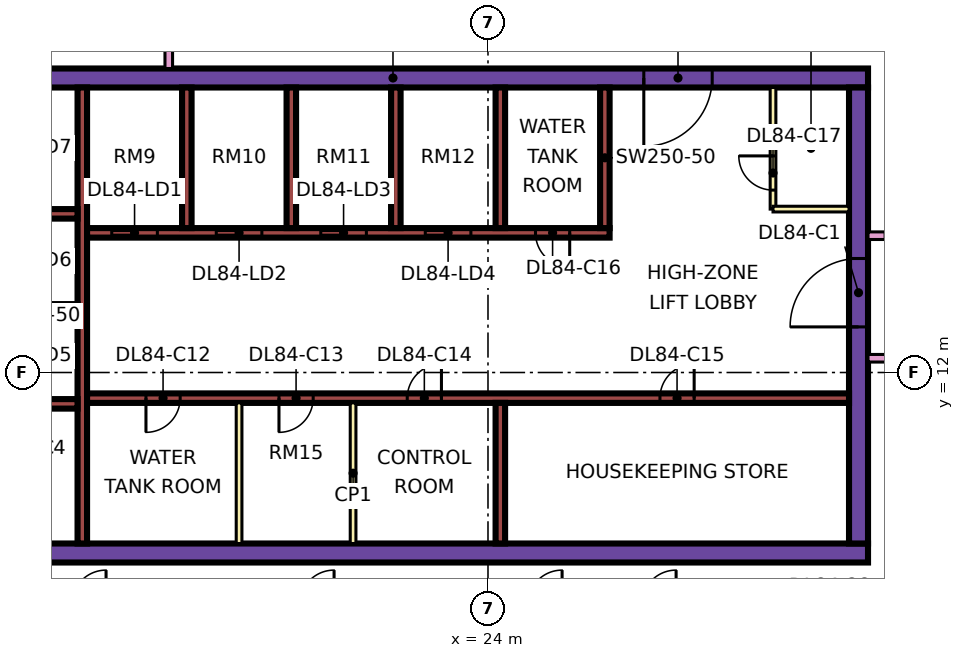
"""IFC4 building model, lengths in metres.
Left out: names, types, materials, properties, quantities, classifications, styles, units other than length and angle.
Written with IfcOpenShell. Run it as: python <this file> out.ifc"""

import sys

from ifc_helpers import new_model, si_unit, direction, frame, frame_2d, origin, place, context, subcontext, project, spatial, rectangle, extrude, element, fill, save


model = new_model("IFC4")
c1 = context("Model", 3, precision=1e-05, world=origin(), true_north=direction((0.0, 1.0)))
c2 = subcontext(c1, "Body", "Model", "MODEL_VIEW")
j1 = project(units=[si_unit("LENGTHUNIT", "METRE"), si_unit("PLANEANGLEUNIT", "RADIAN")], contexts=[c1])
p1 = place(None, origin())
s1 = spatial("IfcSite", under=j1, at=p1, CompositionType="ELEMENT")
p2 = place(p1, origin())
s2 = spatial("IfcBuilding", under=s1, at=p2, CompositionType="ELEMENT")
p3 = place(p2, frame((0.0, 0.0, 361.4)))
s3 = spatial("IfcBuildingStorey", under=s2, at=p3, CompositionType="ELEMENT", Elevation=361.4)
p4 = place(p3, frame((9.0, 7.25, 0.0), z_axis=(0.0, 0.0, 1.0), x_axis=(1.0, 0.0, 0.0)))
e1 = element("IfcWall", 1, at=p4, inside=s3, PredefinedType="SHEAR", context=c2, shape_type="SweptSolid", body=[
    extrude(rectangle(XDim=25.0, YDim=0.5, at=frame_2d((12.5, 0.0))), origin(), (0.0, 0.0, 1.0), 3.75),
])
p5 = place(p3, frame((9.0, 19.75, 0.0), z_axis=(0.0, 0.0, 1.0), x_axis=(1.0, 0.0, 0.0)))
e2 = element("IfcWall", 2, at=p5, inside=s3, PredefinedType="SHEAR", context=c2, shape_type="SweptSolid", body=[
    extrude(rectangle(XDim=25.0, YDim=0.5, at=frame_2d((12.5, 0.0))), origin(), (0.0, 0.0, 1.0), 3.75),
])
p6 = place(p5, frame((19.1, 0.0, 0.0)))
e3 = element("IfcOpeningElement", 3, at=p6, cuts=e2, PredefinedType="OPENING", context=c2, shape_type="SweptSolid", body=[
    extrude(rectangle(XDim=1.8, YDim=2.4, at=frame_2d((0.9, 1.2))), frame((0.0, 0.26, 0.0), z_axis=(0.0, -1.0, 0.0), x_axis=(1.0, 0.0, 0.0)), (0.0, 0.0, 1.0), 0.52),
])
p7 = place(p3, frame((33.75, 7.5, 0.0), z_axis=(0.0, 0.0, 1.0), x_axis=(0.0, 1.0, 0.0)))
e4 = element("IfcWall", 4, at=p7, inside=s3, PredefinedType="SHEAR", context=c2, shape_type="SweptSolid", body=[
    extrude(rectangle(XDim=12.0, YDim=0.5, at=frame_2d((6.0, 0.0))), origin(), (0.0, 0.0, 1.0), 3.75),
])
p8 = place(p7, frame((5.7, 0.0, 0.0)))
e5 = element("IfcOpeningElement", 5, at=p8, cuts=e4, PredefinedType="OPENING", context=c2, shape_type="SweptSolid", body=[
    extrude(rectangle(XDim=1.8, YDim=2.4, at=frame_2d((0.9, 1.2))), frame((0.0, 0.26, 0.0), z_axis=(0.0, -1.0, 0.0), x_axis=(1.0, 0.0, 0.0)), (0.0, 0.0, 1.0), 0.52),
])
p9 = place(p3, frame((13.325, 7.5, 0.0), z_axis=(0.0, 0.0, 1.0), x_axis=(0.0, 1.0, 0.0)))
e6 = element("IfcWall", 6, at=p9, inside=s3, PredefinedType="SHEAR", context=c2, shape_type="SweptSolid", body=[
    extrude(rectangle(XDim=12.0, YDim=0.25, at=frame_2d((6.0, 0.0))), origin(), (0.0, 0.0, 1.0), 3.75),
])
p10 = place(p3, frame((13.45, 11.325, 0.0), z_axis=(0.0, 0.0, 1.0), x_axis=(1.0, 0.0, 0.0)))
e7 = element("IfcWall", 7, at=p10, inside=s3, PredefinedType="SHEAR", context=c2, shape_type="SweptSolid", body=[
    extrude(rectangle(XDim=20.05, YDim=0.25, at=frame_2d((10.025, 0.0))), origin(), (0.0, 0.0, 1.0), 3.75),
])
p11 = place(p10, frame((1.55, 0.0, 0.0)))
e8 = element("IfcOpeningElement", 8, at=p11, cuts=e7, PredefinedType="OPENING", context=c2, shape_type="SweptSolid", body=[
    extrude(rectangle(XDim=0.9, YDim=2.1, at=frame_2d((0.45, 1.05))), frame((0.0, 0.135, 0.0), z_axis=(0.0, -1.0, 0.0), x_axis=(1.0, 0.0, 0.0)), (0.0, 0.0, 1.0), 0.27),
])
p12 = place(p10, frame((5.05, 0.0, 0.0)))
e9 = element("IfcOpeningElement", 9, at=p12, cuts=e7, PredefinedType="OPENING", context=c2, shape_type="SweptSolid", body=[
    extrude(rectangle(XDim=0.9, YDim=2.1, at=frame_2d((0.45, 1.05))), frame((0.0, 0.135, 0.0), z_axis=(0.0, -1.0, 0.0), x_axis=(1.0, 0.0, 0.0)), (0.0, 0.0, 1.0), 0.27),
])
p13 = place(p10, frame((8.425, 0.0, 0.0)))
e10 = element("IfcOpeningElement", 10, at=p13, cuts=e7, PredefinedType="OPENING", context=c2, shape_type="SweptSolid", body=[
    extrude(rectangle(XDim=0.9, YDim=2.1, at=frame_2d((0.45, 1.05))), frame((0.0, 0.135, 0.0), z_axis=(0.0, -1.0, 0.0), x_axis=(1.0, 0.0, 0.0)), (0.0, 0.0, 1.0), 0.27),
])
p14 = place(p10, frame((15.075, 0.0, 0.0)))
e11 = element("IfcOpeningElement", 11, at=p14, cuts=e7, PredefinedType="OPENING", context=c2, shape_type="SweptSolid", body=[
    extrude(rectangle(XDim=0.9, YDim=2.1, at=frame_2d((0.45, 1.05))), frame((0.0, 0.135, 0.0), z_axis=(0.0, -1.0, 0.0), x_axis=(1.0, 0.0, 0.0)), (0.0, 0.0, 1.0), 0.27),
])
p15 = place(p3, frame((13.45, 15.675, 0.0), z_axis=(0.0, 0.0, 1.0), x_axis=(1.0, 0.0, 0.0)))
e12 = element("IfcWall", 12, at=p15, inside=s3, PredefinedType="SHEAR", context=c2, shape_type="SweptSolid", body=[
    extrude(rectangle(XDim=13.75, YDim=0.25, at=frame_2d((6.875, 0.0))), origin(), (0.0, 0.0, 1.0), 3.75),
])
p16 = place(p15, frame((0.65, 0.0, 0.0)))
e13 = element("IfcOpeningElement", 13, at=p16, cuts=e12, PredefinedType="OPENING", context=c2, shape_type="SweptSolid", body=[
    extrude(rectangle(XDim=1.2, YDim=2.2, at=frame_2d((0.6, 1.1))), frame((0.0, 0.135, 0.0), z_axis=(0.0, -1.0, 0.0), x_axis=(1.0, 0.0, 0.0)), (0.0, 0.0, 1.0), 0.27),
])
p17 = place(p15, frame((3.4, 0.0, 0.0)))
e14 = element("IfcOpeningElement", 14, at=p17, cuts=e12, PredefinedType="OPENING", context=c2, shape_type="SweptSolid", body=[
    extrude(rectangle(XDim=1.2, YDim=2.2, at=frame_2d((0.6, 1.1))), frame((0.0, 0.135, 0.0), z_axis=(0.0, -1.0, 0.0), x_axis=(1.0, 0.0, 0.0)), (0.0, 0.0, 1.0), 0.27),
])
p18 = place(p15, frame((6.15, 0.0, 0.0)))
e15 = element("IfcOpeningElement", 15, at=p18, cuts=e12, PredefinedType="OPENING", context=c2, shape_type="SweptSolid", body=[
    extrude(rectangle(XDim=1.2, YDim=2.2, at=frame_2d((0.6, 1.1))), frame((0.0, 0.135, 0.0), z_axis=(0.0, -1.0, 0.0), x_axis=(1.0, 0.0, 0.0)), (0.0, 0.0, 1.0), 0.27),
])
p19 = place(p15, frame((8.9, 0.0, 0.0)))
e16 = element("IfcOpeningElement", 16, at=p19, cuts=e12, PredefinedType="OPENING", context=c2, shape_type="SweptSolid", body=[
    extrude(rectangle(XDim=1.2, YDim=2.2, at=frame_2d((0.6, 1.1))), frame((0.0, 0.135, 0.0), z_axis=(0.0, -1.0, 0.0), x_axis=(1.0, 0.0, 0.0)), (0.0, 0.0, 1.0), 0.27),
])
p20 = place(p15, frame((11.8, 0.0, 0.0)))
e17 = element("IfcOpeningElement", 17, at=p20, cuts=e12, PredefinedType="OPENING", context=c2, shape_type="SweptSolid", body=[
    extrude(rectangle(XDim=0.9, YDim=2.1, at=frame_2d((0.45, 1.05))), frame((0.0, 0.135, 0.0), z_axis=(0.0, -1.0, 0.0), x_axis=(1.0, 0.0, 0.0)), (0.0, 0.0, 1.0), 0.27),
])
for number, where, z_axis, x_axis in (
    (18, (10.2, 11.175, 0.0), (0.0, 0.0, 1.0), (1.0, 0.0, 0.0)),
    (19, (10.2, 13.675, 0.0), (0.0, 0.0, 1.0), (1.0, 0.0, 0.0)),
    (20, (10.2, 16.175, 0.0), (0.0, 0.0, 1.0), (1.0, 0.0, 0.0)),
):
    element("IfcWall", number, at=place(p3, frame(where, z_axis=z_axis, x_axis=x_axis)), inside=s3, PredefinedType="SHEAR", context=c2, shape_type="SweptSolid", body=[
        extrude(rectangle(XDim=3.0, YDim=0.25, at=frame_2d((1.5, 0.0))), origin(), (0.0, 0.0, 1.0), 3.75),
    ])
for number, where, z_axis, x_axis in (
    (21, (24.325, 7.5, 0.0), (0.0, 0.0, 1.0), (0.0, 1.0, 0.0)),
    (22, (16.075, 15.8, 0.0), (0.0, 0.0, 1.0), (0.0, 1.0, 0.0)),
    (23, (18.825, 15.8, 0.0), (0.0, 0.0, 1.0), (0.0, 1.0, 0.0)),
    (24, (21.575, 15.8, 0.0), (0.0, 0.0, 1.0), (0.0, 1.0, 0.0)),
    (25, (24.325, 15.8, 0.0), (0.0, 0.0, 1.0), (0.0, 1.0, 0.0)),
    (26, (27.075, 15.8, 0.0), (0.0, 0.0, 1.0), (0.0, 1.0, 0.0)),
):
    element("IfcWall", number, at=place(p3, frame(where, z_axis=z_axis, x_axis=x_axis)), inside=s3, PredefinedType="SHEAR", context=c2, shape_type="SweptSolid", body=[
        extrude(rectangle(XDim=3.7, YDim=0.25, at=frame_2d((1.85, 0.0))), origin(), (0.0, 0.0, 1.0), 3.75),
    ])
p21 = place(p3, frame((-1.447, 12.553, 0.0), z_axis=(0.0, 0.0, 1.0), x_axis=(0.707106781187, -0.707106781187, 0.0)))
e27 = element("IfcWall", 27, at=p21, inside=s3, PredefinedType="SOLIDWALL", context=c2, shape_type="SweptSolid", body=[
    extrude(rectangle(XDim=19.799, YDim=0.15, at=frame_2d((9.899, 0.0))), origin(), (0.0, 0.0, 1.0), 3.35),
])
p22 = place(p21, frame((2.212, 0.0, 0.45)))
e28 = element("IfcOpeningElement", 28, at=p22, cuts=e27, PredefinedType="OPENING", context=c2, shape_type="SweptSolid", body=[
    extrude(rectangle(XDim=3.0, YDim=2.4, at=frame_2d((1.5, 1.2))), frame((0.0, 0.085, 0.0), z_axis=(0.0, -1.0, 0.0), x_axis=(1.0, 0.0, 0.0)), (0.0, 0.0, 1.0), 0.17),
])
p23 = place(p21, frame((10.216, 0.0, 0.45)))
e29 = element("IfcOpeningElement", 29, at=p23, cuts=e27, PredefinedType="OPENING", context=c2, shape_type="SweptSolid", body=[
    extrude(rectangle(XDim=3.0, YDim=2.4, at=frame_2d((1.5, 1.2))), frame((0.0, 0.085, 0.0), z_axis=(0.0, -1.0, 0.0), x_axis=(1.0, 0.0, 0.0)), (0.0, 0.0, 1.0), 0.17),
])
for number, where, z_axis, x_axis in (
    (30, (17.45, 7.5, 0.0), (0.0, 0.0, 1.0), (0.0, 1.0, 0.0)),
    (31, (20.45, 7.5, 0.0), (0.0, 0.0, 1.0), (0.0, 1.0, 0.0)),
):
    element("IfcWall", number, at=place(p3, frame(where, z_axis=z_axis, x_axis=x_axis)), inside=s3, PredefinedType="PARTITIONING", context=c2, shape_type="SweptSolid", body=[
        extrude(rectangle(XDim=3.7, YDim=0.15, at=frame_2d((1.85, 0.0))), origin(), (0.0, 0.0, 1.0), 3.35),
    ])
p24 = place(p3, frame((31.5, 16.3, 0.0), z_axis=(0.0, 0.0, 1.0), x_axis=(0.0, 1.0, 0.0)))
e32 = element("IfcWall", 32, at=p24, inside=s3, PredefinedType="PARTITIONING", context=c2, shape_type="SweptSolid", body=[
    extrude(rectangle(XDim=3.2, YDim=0.15, at=frame_2d((1.6, 0.0))), origin(), (0.0, 0.0, 1.0), 3.35),
])
p25 = place(p24, frame((0.5, 0.0, 0.0)))
e33 = element("IfcOpeningElement", 33, at=p25, cuts=e32, PredefinedType="OPENING", context=c2, shape_type="SweptSolid", body=[
    extrude(rectangle(XDim=0.9, YDim=2.1, at=frame_2d((0.45, 1.05))), frame((0.0, 0.085, 0.0), z_axis=(0.0, -1.0, 0.0), x_axis=(1.0, 0.0, 0.0)), (0.0, 0.0, 1.0), 0.17),
])
p26 = place(p3, frame((31.5, 16.3, 0.0), z_axis=(0.0, 0.0, 1.0), x_axis=(1.0, 0.0, 0.0)))
e34 = element("IfcWall", 34, at=p26, inside=s3, PredefinedType="PARTITIONING", context=c2, shape_type="SweptSolid", body=[
    extrude(rectangle(XDim=2.0, YDim=0.15, at=frame_2d((1.0, 0.0))), origin(), (0.0, 0.0, 1.0), 3.35),
])
p27 = place(p3, frame((15.6, 20.0, 0.0), z_axis=(0.0, 0.0, 1.0), x_axis=(0.0, 1.0, 0.0)))
e35 = element("IfcWall", 35, at=p27, inside=s3, PredefinedType="PARTITIONING", context=c2, shape_type="SweptSolid", body=[
    extrude(rectangle(XDim=27.775, YDim=0.2, at=frame_2d((13.887, 0.0))), origin(), (0.0, 0.0, 1.0), 3.35),
])
p28 = place(p27, frame((7.15, 0.0, 0.0)))
e36 = element("IfcOpeningElement", 36, at=p28, cuts=e35, PredefinedType="OPENING", context=c2, shape_type="SweptSolid", body=[
    extrude(rectangle(XDim=1.6, YDim=2.1, at=frame_2d((0.8, 1.05))), frame((0.0, 0.11, 0.0), z_axis=(0.0, -1.0, 0.0), x_axis=(1.0, 0.0, 0.0)), (0.0, 0.0, 1.0), 0.22),
])
p29 = place(p27, frame((13.5, 0.0, 0.0)))
e37 = element("IfcOpeningElement", 37, at=p29, cuts=e35, PredefinedType="OPENING", context=c2, shape_type="SweptSolid", body=[
    extrude(rectangle(XDim=1.0, YDim=2.1, at=frame_2d((0.5, 1.05))), frame((0.0, 0.11, 0.0), z_axis=(0.0, -1.0, 0.0), x_axis=(1.0, 0.0, 0.0)), (0.0, 0.0, 1.0), 0.22),
])
p30 = place(p27, frame((17.05, 0.0, 0.0)))
e38 = element("IfcOpeningElement", 38, at=p30, cuts=e35, PredefinedType="OPENING", context=c2, shape_type="SweptSolid", body=[
    extrude(rectangle(XDim=1.0, YDim=2.1, at=frame_2d((0.5, 1.05))), frame((0.0, 0.11, 0.0), z_axis=(0.0, -1.0, 0.0), x_axis=(1.0, 0.0, 0.0)), (0.0, 0.0, 1.0), 0.22),
])
p31 = place(p27, frame((1.15, 0.0, 0.0)))
e39 = element("IfcOpeningElement", 39, at=p31, cuts=e35, PredefinedType="OPENING", context=c2, shape_type="SweptSolid", body=[
    extrude(rectangle(XDim=1.8, YDim=2.1, at=frame_2d((0.9, 1.05))), frame((0.0, 0.11, 0.0), z_axis=(0.0, -1.0, 0.0), x_axis=(1.0, 0.0, 0.0)), (0.0, 0.0, 1.0), 0.22),
])
p32 = place(p27, frame((25.9, 0.0, 0.0)))
e40 = element("IfcOpeningElement", 40, at=p32, cuts=e35, PredefinedType="OPENING", context=c2, shape_type="SweptSolid", body=[
    extrude(rectangle(XDim=1.0, YDim=2.1, at=frame_2d((0.5, 1.05))), frame((0.0, 0.11, 0.0), z_axis=(0.0, -1.0, 0.0), x_axis=(1.0, 0.0, 0.0)), (0.0, 0.0, 1.0), 0.22),
])
p33 = place(p3, frame((34.0, 12.375, 0.0), z_axis=(0.0, 0.0, 1.0), x_axis=(1.0, 0.0, 0.0)))
e41 = element("IfcWall", 41, at=p33, inside=s3, PredefinedType="PARTITIONING", context=c2, shape_type="SweptSolid", body=[
    extrude(rectangle(XDim=2.376, YDim=0.2, at=frame_2d((1.188, 0.0))), origin(), (0.0, 0.0, 1.0), 3.35),
])
p34 = place(p3, frame((34.0, 15.6, 0.0), z_axis=(0.0, 0.0, 1.0), x_axis=(1.0, 0.0, 0.0)))
e42 = element("IfcWall", 42, at=p34, inside=s3, PredefinedType="PARTITIONING", context=c2, shape_type="SweptSolid", body=[
    extrude(rectangle(XDim=10.35, YDim=0.2, at=frame_2d((5.175, 0.0))), origin(), (0.0, 0.0, 1.0), 3.35),
])
p35 = place(p34, frame((5.6, 0.0, 0.0)))
e43 = element("IfcOpeningElement", 43, at=p35, cuts=e42, PredefinedType="OPENING", context=c2, shape_type="SweptSolid", body=[
    extrude(rectangle(XDim=1.0, YDim=2.1, at=frame_2d((0.5, 1.05))), frame((0.0, 0.11, 0.0), z_axis=(0.0, -1.0, 0.0), x_axis=(1.0, 0.0, 0.0)), (0.0, 0.0, 1.0), 0.22),
])
p36 = place(p34, frame((0.45, 0.0, 0.0)))
e44 = element("IfcOpeningElement", 44, at=p36, cuts=e42, PredefinedType="OPENING", context=c2, shape_type="SweptSolid", body=[
    extrude(rectangle(XDim=1.2, YDim=2.1, at=frame_2d((0.6, 1.05))), frame((0.0, 0.11, 0.0), z_axis=(0.0, -1.0, 0.0), x_axis=(1.0, 0.0, 0.0)), (0.0, 0.0, 1.0), 0.22),
])
p37 = place(p16, origin())
e45 = element("IfcDoor", 45, at=p37, inside=s3, OperationType="DOUBLE_DOOR_SLIDING", PredefinedType="DOOR", context=c2, shape_type="SweptSolid", body=[
    extrude(rectangle(XDim=1.2, YDim=2.2, at=frame_2d((0.6, 1.1))), frame((0.0, 0.025, 0.0), z_axis=(0.0, -1.0, 0.0), x_axis=(1.0, 0.0, 0.0)), (0.0, 0.0, 1.0), 0.05),
])
fill(e13, e45)
p38 = place(p17, origin())
e46 = element("IfcDoor", 46, at=p38, inside=s3, OperationType="DOUBLE_DOOR_SLIDING", PredefinedType="DOOR", context=c2, shape_type="SweptSolid", body=[
    extrude(rectangle(XDim=1.2, YDim=2.2, at=frame_2d((0.6, 1.1))), frame((0.0, 0.025, 0.0), z_axis=(0.0, -1.0, 0.0), x_axis=(1.0, 0.0, 0.0)), (0.0, 0.0, 1.0), 0.05),
])
fill(e14, e46)
p39 = place(p18, origin())
e47 = element("IfcDoor", 47, at=p39, inside=s3, OperationType="DOUBLE_DOOR_SLIDING", PredefinedType="DOOR", context=c2, shape_type="SweptSolid", body=[
    extrude(rectangle(XDim=1.2, YDim=2.2, at=frame_2d((0.6, 1.1))), frame((0.0, 0.025, 0.0), z_axis=(0.0, -1.0, 0.0), x_axis=(1.0, 0.0, 0.0)), (0.0, 0.0, 1.0), 0.05),
])
fill(e15, e47)
p40 = place(p19, origin())
e48 = element("IfcDoor", 48, at=p40, inside=s3, OperationType="DOUBLE_DOOR_SLIDING", PredefinedType="DOOR", context=c2, shape_type="SweptSolid", body=[
    extrude(rectangle(XDim=1.2, YDim=2.2, at=frame_2d((0.6, 1.1))), frame((0.0, 0.025, 0.0), z_axis=(0.0, -1.0, 0.0), x_axis=(1.0, 0.0, 0.0)), (0.0, 0.0, 1.0), 0.05),
])
fill(e16, e48)
p41 = place(p8, origin())
e49 = element("IfcDoor", 49, at=p41, inside=s3, OperationType="DOUBLE_DOOR_SINGLE_SWING", PredefinedType="DOOR", context=c2, shape_type="SweptSolid", body=[
    extrude(rectangle(XDim=1.8, YDim=2.4, at=frame_2d((0.9, 1.2))), frame((0.0, 0.025, 0.0), z_axis=(0.0, -1.0, 0.0), x_axis=(1.0, 0.0, 0.0)), (0.0, 0.0, 1.0), 0.05),
])
fill(e5, e49)
p42 = place(p6, frame((1.8, 0.0, 0.0), z_axis=(0.0, 0.0, 1.0), x_axis=(-1.0, 0.0, 0.0)))
e50 = element("IfcDoor", 50, at=p42, inside=s3, OperationType="DOUBLE_DOOR_SINGLE_SWING", PredefinedType="DOOR", context=c2, shape_type="SweptSolid", body=[
    extrude(rectangle(XDim=1.8, YDim=2.4, at=frame_2d((0.9, 1.2))), frame((0.0, 0.025, 0.0), z_axis=(0.0, -1.0, 0.0), x_axis=(1.0, 0.0, 0.0)), (0.0, 0.0, 1.0), 0.05),
])
fill(e3, e50)
p43 = place(p11, frame((0.9, 0.0, 0.0), z_axis=(0.0, 0.0, 1.0), x_axis=(-1.0, 0.0, 0.0)))
e51 = element("IfcDoor", 51, at=p43, inside=s3, OperationType="SINGLE_SWING_LEFT", PredefinedType="DOOR", context=c2, shape_type="SweptSolid", body=[
    extrude(rectangle(XDim=0.9, YDim=2.1, at=frame_2d((0.45, 1.05))), frame((0.0, 0.025, 0.0), z_axis=(0.0, -1.0, 0.0), x_axis=(1.0, 0.0, 0.0)), (0.0, 0.0, 1.0), 0.05),
])
fill(e8, e51)
p44 = place(p12, frame((0.9, 0.0, 0.0), z_axis=(0.0, 0.0, 1.0), x_axis=(-1.0, 0.0, 0.0)))
e52 = element("IfcDoor", 52, at=p44, inside=s3, OperationType="SINGLE_SWING_LEFT", PredefinedType="DOOR", context=c2, shape_type="SweptSolid", body=[
    extrude(rectangle(XDim=0.9, YDim=2.1, at=frame_2d((0.45, 1.05))), frame((0.0, 0.025, 0.0), z_axis=(0.0, -1.0, 0.0), x_axis=(1.0, 0.0, 0.0)), (0.0, 0.0, 1.0), 0.05),
])
fill(e9, e52)
p45 = place(p13, frame((0.9, 0.0, 0.0), z_axis=(0.0, 0.0, 1.0), x_axis=(-1.0, 0.0, 0.0)))
e53 = element("IfcDoor", 53, at=p45, inside=s3, OperationType="SINGLE_SWING_RIGHT", PredefinedType="DOOR", context=c2, shape_type="SweptSolid", body=[
    extrude(rectangle(XDim=0.9, YDim=2.1, at=frame_2d((0.45, 1.05))), frame((0.0, 0.025, 0.0), z_axis=(0.0, -1.0, 0.0), x_axis=(1.0, 0.0, 0.0)), (0.0, 0.0, 1.0), 0.05),
])
fill(e10, e53)
p46 = place(p14, frame((0.9, 0.0, 0.0), z_axis=(0.0, 0.0, 1.0), x_axis=(-1.0, 0.0, 0.0)))
e54 = element("IfcDoor", 54, at=p46, inside=s3, OperationType="SINGLE_SWING_RIGHT", PredefinedType="DOOR", context=c2, shape_type="SweptSolid", body=[
    extrude(rectangle(XDim=0.9, YDim=2.1, at=frame_2d((0.45, 1.05))), frame((0.0, 0.025, 0.0), z_axis=(0.0, -1.0, 0.0), x_axis=(1.0, 0.0, 0.0)), (0.0, 0.0, 1.0), 0.05),
])
fill(e11, e54)
p47 = place(p20, origin())
e55 = element("IfcDoor", 55, at=p47, inside=s3, OperationType="SINGLE_SWING_RIGHT", PredefinedType="DOOR", context=c2, shape_type="SweptSolid", body=[
    extrude(rectangle(XDim=0.9, YDim=2.1, at=frame_2d((0.45, 1.05))), frame((0.0, 0.025, 0.0), z_axis=(0.0, -1.0, 0.0), x_axis=(1.0, 0.0, 0.0)), (0.0, 0.0, 1.0), 0.05),
])
fill(e17, e55)
p48 = place(p25, frame((0.9, 0.0, 0.0), z_axis=(0.0, 0.0, 1.0), x_axis=(-1.0, 0.0, 0.0)))
e56 = element("IfcDoor", 56, at=p48, inside=s3, OperationType="SINGLE_SWING_RIGHT", PredefinedType="DOOR", context=c2, shape_type="SweptSolid", body=[
    extrude(rectangle(XDim=0.9, YDim=2.1, at=frame_2d((0.45, 1.05))), frame((0.0, 0.025, 0.0), z_axis=(0.0, -1.0, 0.0), x_axis=(1.0, 0.0, 0.0)), (0.0, 0.0, 1.0), 0.05),
])
fill(e33, e56)
save(model, sys.argv[1])
